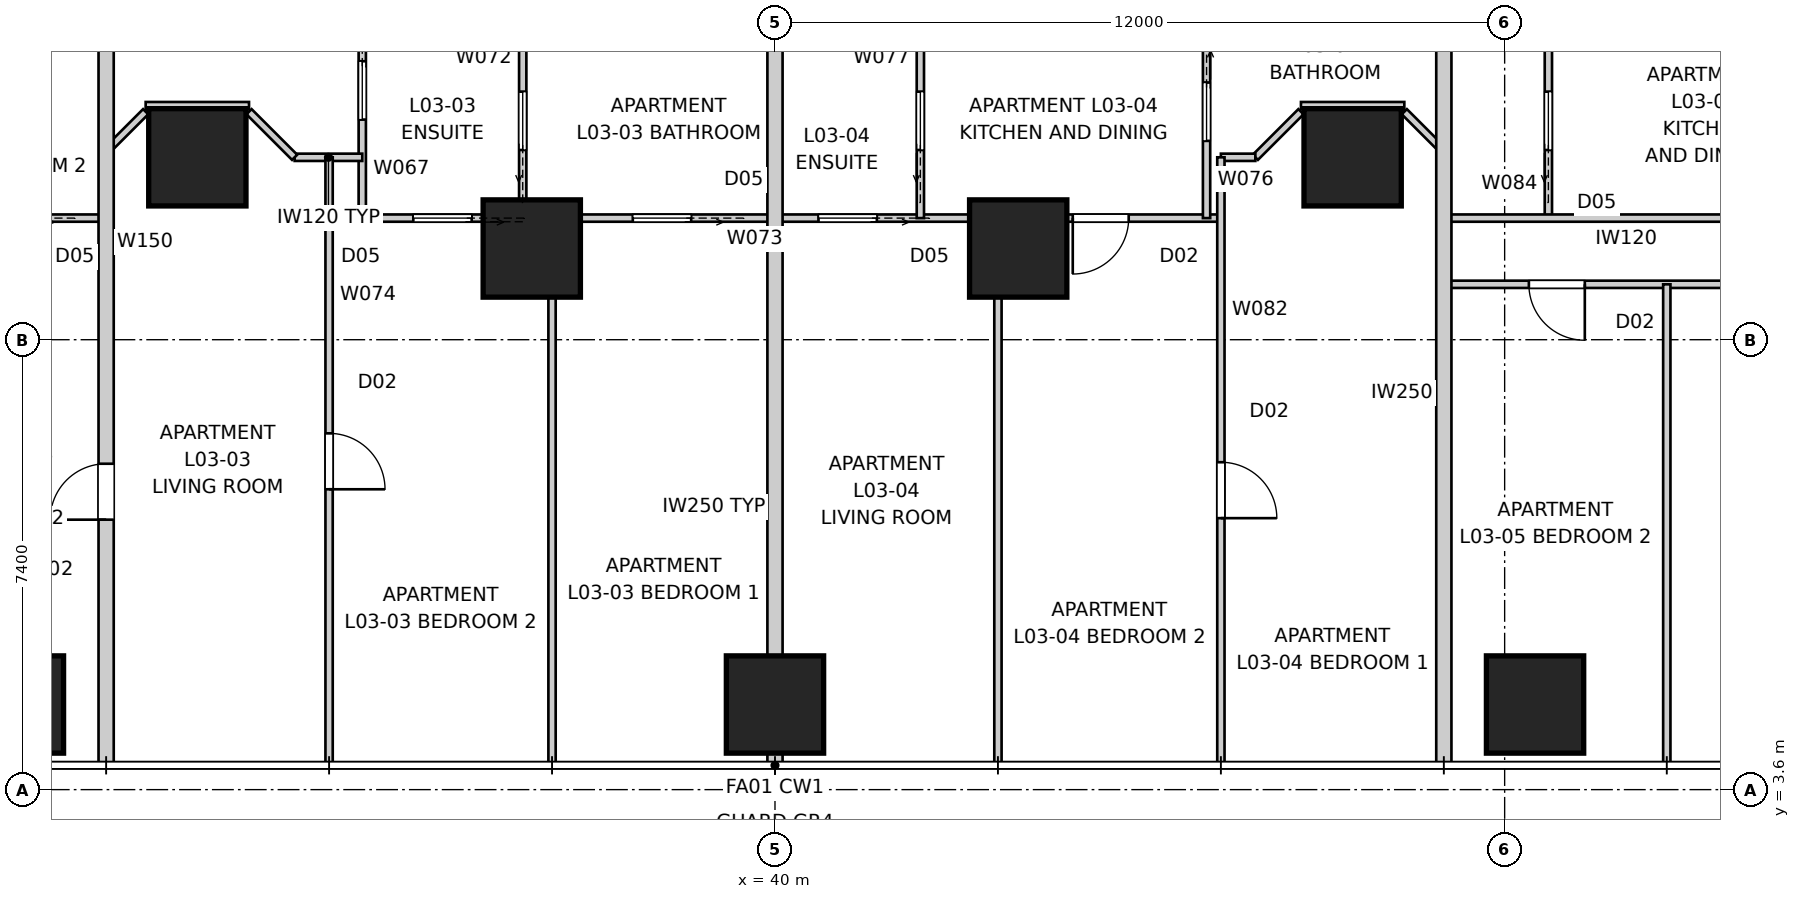
"""IFC4 building model, lengths in metres.
Left out: names, types, materials, properties, quantities, classifications, styles, units other than length and angle.
Written with IfcOpenShell. Run it as: python <this file> out.ifc"""

import sys

from ifc_helpers import new_model, si_unit, direction, frame, frame_2d, origin, origin_2d, place, context, subcontext, project, spatial, rectangle, extrude, element, fill, save


model = new_model("IFC4")
c1 = context("Model", 3, precision=1e-05, world=origin(), true_north=direction((0.0, 1.0)))
c2 = subcontext(c1, "Body", "Model", "MODEL_VIEW")
j1 = project(units=[si_unit("LENGTHUNIT", "METRE"), si_unit("PLANEANGLEUNIT", "RADIAN")], contexts=[c1])
p1 = place(None, origin())
s1 = spatial("IfcSite", under=j1, at=p1, CompositionType="ELEMENT")
p2 = place(p1, origin())
s2 = spatial("IfcBuilding", under=s1, at=p2, CompositionType="ELEMENT")
p3 = place(p2, frame((0.0, 0.0, 15.0)))
s3 = spatial("IfcBuildingStorey", under=s2, at=p3, CompositionType="ELEMENT", Elevation=15.0)
for number, where, z_axis, x_axis in (
    (1, (27.5, 5.0, 0.0), (0.0, 0.0, 1.0), (1.0, 0.0, 0.0)),
    (2, (40.0, 5.0, 0.0), (0.0, 0.0, 1.0), (1.0, 0.0, 0.0)),
    (3, (52.5, 5.0, 0.0), (0.0, 0.0, 1.0), (1.0, 0.0, 0.0)),
    (4, (30.5, 14.0, 0.0), (0.0, 0.0, 1.0), (1.0, 0.0, 0.0)),
    (5, (36.0, 12.5, 0.0), (0.0, 0.0, 1.0), (1.0, 0.0, 0.0)),
    (6, (44.0, 12.5, 0.0), (0.0, 0.0, 1.0), (1.0, 0.0, 0.0)),
    (7, (49.5, 14.0, 0.0), (0.0, 0.0, 1.0), (1.0, 0.0, 0.0)),
):
    element("IfcColumn", number, at=place(p3, frame(where, z_axis=z_axis, x_axis=x_axis)), inside=s3, PredefinedType="COLUMN", context=c2, shape_type="SweptSolid", body=[
        extrude(rectangle(XDim=1.6, YDim=1.6, at=origin_2d()), origin(), (0.0, 0.0, 1.0), 3.4),
    ])
p4 = place(p3, frame((29.0, 4.0, 0.0), z_axis=(0.0, 0.0, 1.0), x_axis=(0.0, 1.0, 0.0)))
e8 = element("IfcWall", 8, at=p4, inside=s3, PredefinedType="PARTITIONING", context=c2, shape_type="SweptSolid", body=[
    extrude(rectangle(XDim=12.24, YDim=0.25, at=frame_2d((6.12, 0.0))), origin(), (0.0, 0.0, 1.0), 3.25),
])
p5 = place(p4, frame((4.04, 0.0, 0.0)))
e9 = element("IfcOpeningElement", 9, at=p5, cuts=e8, PredefinedType="OPENING", context=c2, shape_type="SweptSolid", body=[
    extrude(rectangle(XDim=0.92, YDim=2.34, at=frame_2d((0.46, 1.17))), frame((0.0, 0.135, 0.0), z_axis=(0.0, -1.0, 0.0), x_axis=(1.0, 0.0, 0.0)), (0.0, 0.0, 1.0), 0.27),
])
p6 = place(p3, frame((40.0, 4.0, 0.0), z_axis=(0.0, 0.0, 1.0), x_axis=(0.0, 1.0, 0.0)))
e10 = element("IfcWall", 10, at=p6, inside=s3, PredefinedType="PARTITIONING", context=c2, shape_type="SweptSolid", body=[
    extrude(rectangle(XDim=8.5, YDim=0.25, at=frame_2d((4.25, 0.0))), origin(), (0.0, 0.0, 1.0), 3.25),
])
p7 = place(p3, frame((40.0, 12.5, 0.0), z_axis=(0.0, 0.0, 1.0), x_axis=(0.0, 1.0, 0.0)))
e11 = element("IfcWall", 11, at=p7, inside=s3, PredefinedType="PARTITIONING", context=c2, shape_type="SweptSolid", body=[
    extrude(rectangle(XDim=3.74, YDim=0.25, at=frame_2d((1.87, 0.0))), origin(), (0.0, 0.0, 1.0), 2.796),
])
p8 = place(p3, frame((51.0, 4.0, 0.0), z_axis=(0.0, 0.0, 1.0), x_axis=(0.0, 1.0, 0.0)))
e12 = element("IfcWall", 12, at=p8, inside=s3, PredefinedType="PARTITIONING", context=c2, shape_type="SweptSolid", body=[
    extrude(rectangle(XDim=12.24, YDim=0.25, at=frame_2d((6.12, 0.0))), origin(), (0.0, 0.0, 1.0), 3.25),
])
p9 = place(p3, frame((29.0, 13.0, 0.0), z_axis=(0.0, 0.0, 1.0), x_axis=(-1.0, 0.0, 0.0)))
e13 = element("IfcWall", 13, at=p9, inside=s3, PredefinedType="PARTITIONING", context=c2, shape_type="SweptSolid", body=[
    extrude(rectangle(XDim=6.0, YDim=0.12, at=frame_2d((3.0, 0.0))), origin(), (0.0, 0.0, 1.0), 3.25),
])
p10 = place(p9, frame((1.378, 0.0, 0.0)))
e14 = element("IfcOpeningElement", 14, at=p10, cuts=e13, PredefinedType="OPENING", context=c2, shape_type="SweptSolid", body=[
    extrude(rectangle(XDim=0.96, YDim=2.1, at=frame_2d((0.48, 1.05))), frame((0.0, 0.07, 0.0), z_axis=(0.0, -1.0, 0.0), x_axis=(1.0, 0.0, 0.0)), (0.0, 0.0, 1.0), 0.14),
])
p11 = place(p3, frame((33.212, 16.2, 0.0), z_axis=(0.0, 0.0, 1.0), x_axis=(0.0, -1.0, 0.0)))
e15 = element("IfcWall", 15, at=p11, inside=s3, PredefinedType="PARTITIONING", context=c2, shape_type="SweptSolid", body=[
    extrude(rectangle(XDim=3.2, YDim=0.12, at=frame_2d((1.6, 0.0))), origin(), (0.0, 0.0, 1.0), 3.25),
])
p12 = place(p11, frame((0.62, 0.0, 0.0)))
e16 = element("IfcOpeningElement", 16, at=p12, cuts=e15, PredefinedType="OPENING", context=c2, shape_type="SweptSolid", body=[
    extrude(rectangle(XDim=0.96, YDim=2.1, at=frame_2d((0.48, 1.05))), frame((0.0, 0.07, 0.0), z_axis=(0.0, -1.0, 0.0), x_axis=(1.0, 0.0, 0.0)), (0.0, 0.0, 1.0), 0.14),
])
p13 = place(p3, frame((33.212, 14.0, 0.0), z_axis=(0.0, 0.0, 1.0), x_axis=(-1.0, 0.0, 0.0)))
e17 = element("IfcWall", 17, at=p13, inside=s3, PredefinedType="PARTITIONING", context=c2, shape_type="SweptSolid", body=[
    extrude(rectangle(XDim=1.112, YDim=0.12, at=frame_2d((0.556, 0.0))), origin(), (0.0, 0.0, 1.0), 3.25),
])
p14 = place(p3, frame((32.1, 14.0, 0.0), z_axis=(0.0, 0.0, 1.0), x_axis=(-0.707106781187, 0.707106781187, 0.0)))
e18 = element("IfcWall", 18, at=p14, inside=s3, PredefinedType="PARTITIONING", context=c2, shape_type="SweptSolid", body=[
    extrude(rectangle(XDim=1.061, YDim=0.12, at=frame_2d((0.53, 0.0))), origin(), (0.0, 0.0, 1.0), 3.25),
])
p15 = place(p3, frame((31.35, 14.85, 0.0), z_axis=(0.0, 0.0, 1.0), x_axis=(-1.0, 0.0, 0.0)))
e19 = element("IfcWall", 19, at=p15, inside=s3, PredefinedType="PARTITIONING", context=c2, shape_type="SweptSolid", body=[
    extrude(rectangle(XDim=1.7, YDim=0.12, at=frame_2d((0.85, 0.0))), origin(), (0.0, 0.0, 1.0), 3.25),
])
p16 = place(p3, frame((29.65, 14.75, 0.0), z_axis=(0.0, 0.0, 1.0), x_axis=(-0.707106781187, -0.707106781187, 0.0)))
e20 = element("IfcWall", 20, at=p16, inside=s3, PredefinedType="PARTITIONING", context=c2, shape_type="SweptSolid", body=[
    extrude(rectangle(XDim=0.919, YDim=0.12, at=frame_2d((0.459, 0.0))), origin(), (0.0, 0.0, 1.0), 3.25),
])
p17 = place(p3, frame((35.851, 13.0, 0.0), z_axis=(0.0, 0.0, 1.0), x_axis=(0.0, 1.0, 0.0)))
e21 = element("IfcWall", 21, at=p17, inside=s3, PredefinedType="PARTITIONING", context=c2, shape_type="SweptSolid", body=[
    extrude(rectangle(XDim=3.2, YDim=0.12, at=frame_2d((1.6, 0.0))), origin(), (0.0, 0.0, 1.0), 3.25),
])
p18 = place(p17, frame((1.12, 0.0, 0.0)))
e22 = element("IfcOpeningElement", 22, at=p18, cuts=e21, PredefinedType="OPENING", context=c2, shape_type="SweptSolid", body=[
    extrude(rectangle(XDim=0.96, YDim=2.1, at=frame_2d((0.48, 1.05))), frame((0.0, 0.07, 0.0), z_axis=(0.0, -1.0, 0.0), x_axis=(1.0, 0.0, 0.0)), (0.0, 0.0, 1.0), 0.14),
])
p19 = place(p3, frame((47.333, 13.0, 0.0), z_axis=(0.0, 0.0, 1.0), x_axis=(-1.0, 0.0, 0.0)))
e23 = element("IfcWall", 23, at=p19, inside=s3, PredefinedType="PARTITIONING", context=c2, shape_type="SweptSolid", body=[
    extrude(rectangle(XDim=14.121, YDim=0.12, at=frame_2d((7.061, 0.0))), origin(), (0.0, 0.0, 1.0), 2.549),
])
p20 = place(p19, frame((1.516, 0.0, 0.0)))
e24 = element("IfcOpeningElement", 24, at=p20, cuts=e23, PredefinedType="OPENING", context=c2, shape_type="SweptSolid", body=[
    extrude(rectangle(XDim=0.92, YDim=2.34, at=frame_2d((0.46, 1.17))), frame((0.0, 0.07, 0.0), z_axis=(0.0, -1.0, 0.0), x_axis=(1.0, 0.0, 0.0)), (0.0, 0.0, 1.0), 0.14),
])
p21 = place(p19, frame((5.658, 0.0, 0.0)))
e25 = element("IfcOpeningElement", 25, at=p21, cuts=e23, PredefinedType="OPENING", context=c2, shape_type="SweptSolid", body=[
    extrude(rectangle(XDim=0.96, YDim=2.1, at=frame_2d((0.48, 1.05))), frame((0.0, 0.07, 0.0), z_axis=(0.0, -1.0, 0.0), x_axis=(1.0, 0.0, 0.0)), (0.0, 0.0, 1.0), 0.14),
])
p22 = place(p19, frame((12.322, 0.0, 0.0)))
e26 = element("IfcOpeningElement", 26, at=p22, cuts=e23, PredefinedType="OPENING", context=c2, shape_type="SweptSolid", body=[
    extrude(rectangle(XDim=0.96, YDim=2.1, at=frame_2d((0.48, 1.05))), frame((0.0, 0.07, 0.0), z_axis=(0.0, -1.0, 0.0), x_axis=(1.0, 0.0, 0.0)), (0.0, 0.0, 1.0), 0.14),
])
p23 = place(p19, frame((8.712, 0.0, 0.0)))
e27 = element("IfcOpeningElement", 27, at=p23, cuts=e23, PredefinedType="OPENING", context=c2, shape_type="SweptSolid", body=[
    extrude(rectangle(XDim=0.96, YDim=2.1, at=frame_2d((0.48, 1.05))), frame((0.0, 0.07, 0.0), z_axis=(0.0, -1.0, 0.0), x_axis=(1.0, 0.0, 0.0)), (0.0, 0.0, 1.0), 0.14),
])
p24 = place(p3, frame((32.667, 14.0, 0.0), z_axis=(0.0, 0.0, 1.0), x_axis=(0.0, -1.0, 0.0)))
e28 = element("IfcWall", 28, at=p24, inside=s3, PredefinedType="PARTITIONING", context=c2, shape_type="SweptSolid", body=[
    extrude(rectangle(XDim=9.96, YDim=0.12, at=frame_2d((4.98, 0.0))), origin(), (0.0, 0.0, 1.0), 3.25),
])
p25 = place(p24, frame((4.54, 0.0, 0.0)))
e29 = element("IfcOpeningElement", 29, at=p25, cuts=e28, PredefinedType="OPENING", context=c2, shape_type="SweptSolid", body=[
    extrude(rectangle(XDim=0.92, YDim=2.34, at=frame_2d((0.46, 1.17))), frame((0.0, 0.07, 0.0), z_axis=(0.0, -1.0, 0.0), x_axis=(1.0, 0.0, 0.0)), (0.0, 0.0, 1.0), 0.14),
])
p26 = place(p3, frame((36.333, 4.04, 0.0), z_axis=(0.0, 0.0, 1.0), x_axis=(0.0, 1.0, 0.0)))
e30 = element("IfcWall", 30, at=p26, inside=s3, PredefinedType="PARTITIONING", context=c2, shape_type="SweptSolid", body=[
    extrude(rectangle(XDim=8.96, YDim=0.12, at=frame_2d((4.48, 0.0))), origin(), (0.0, 0.0, 1.0), 3.25),
])
p27 = place(p3, frame((47.098, 16.2, 0.0), z_axis=(0.0, 0.0, 1.0), x_axis=(0.0, -1.0, 0.0)))
e31 = element("IfcWall", 31, at=p27, inside=s3, PredefinedType="PARTITIONING", context=c2, shape_type="SweptSolid", body=[
    extrude(rectangle(XDim=3.2, YDim=0.12, at=frame_2d((1.6, 0.0))), origin(), (0.0, 0.0, 1.0), 3.25),
])
p28 = place(p27, frame((0.97, 0.0, 0.0)))
e32 = element("IfcOpeningElement", 32, at=p28, cuts=e31, PredefinedType="OPENING", context=c2, shape_type="SweptSolid", body=[
    extrude(rectangle(XDim=0.96, YDim=2.1, at=frame_2d((0.48, 1.05))), frame((0.0, 0.07, 0.0), z_axis=(0.0, -1.0, 0.0), x_axis=(1.0, 0.0, 0.0)), (0.0, 0.0, 1.0), 0.14),
])
p29 = place(p3, frame((42.391, 13.0, 0.0), z_axis=(0.0, 0.0, 1.0), x_axis=(0.0, 1.0, 0.0)))
e33 = element("IfcWall", 33, at=p29, inside=s3, PredefinedType="PARTITIONING", context=c2, shape_type="SweptSolid", body=[
    extrude(rectangle(XDim=3.2, YDim=0.12, at=frame_2d((1.6, 0.0))), origin(), (0.0, 0.0, 1.0), 3.25),
])
p30 = place(p29, frame((1.12, 0.0, 0.0)))
e34 = element("IfcOpeningElement", 34, at=p30, cuts=e33, PredefinedType="OPENING", context=c2, shape_type="SweptSolid", body=[
    extrude(rectangle(XDim=0.96, YDim=2.1, at=frame_2d((0.48, 1.05))), frame((0.0, 0.07, 0.0), z_axis=(0.0, -1.0, 0.0), x_axis=(1.0, 0.0, 0.0)), (0.0, 0.0, 1.0), 0.14),
])
p31 = place(p3, frame((51.0, 14.1, 0.0), z_axis=(0.0, 0.0, 1.0), x_axis=(-0.707106781187, 0.707106781187, 0.0)))
e35 = element("IfcWall", 35, at=p31, inside=s3, PredefinedType="PARTITIONING", context=c2, shape_type="SweptSolid", body=[
    extrude(rectangle(XDim=0.919, YDim=0.12, at=frame_2d((0.459, 0.0))), origin(), (0.0, 0.0, 1.0), 3.25),
])
p32 = place(p3, frame((50.35, 14.85, 0.0), z_axis=(0.0, 0.0, 1.0), x_axis=(-1.0, 0.0, 0.0)))
e36 = element("IfcWall", 36, at=p32, inside=s3, PredefinedType="PARTITIONING", context=c2, shape_type="SweptSolid", body=[
    extrude(rectangle(XDim=1.7, YDim=0.12, at=frame_2d((0.85, 0.0))), origin(), (0.0, 0.0, 1.0), 3.25),
])
p33 = place(p3, frame((48.65, 14.75, 0.0), z_axis=(0.0, 0.0, 1.0), x_axis=(-0.707106781187, -0.707106781187, 0.0)))
e37 = element("IfcWall", 37, at=p33, inside=s3, PredefinedType="PARTITIONING", context=c2, shape_type="SweptSolid", body=[
    extrude(rectangle(XDim=1.061, YDim=0.12, at=frame_2d((0.53, 0.0))), origin(), (0.0, 0.0, 1.0), 3.25),
])
p34 = place(p3, frame((47.9, 14.0, 0.0), z_axis=(0.0, 0.0, 1.0), x_axis=(-1.0, 0.0, 0.0)))
e38 = element("IfcWall", 38, at=p34, inside=s3, PredefinedType="PARTITIONING", context=c2, shape_type="SweptSolid", body=[
    extrude(rectangle(XDim=0.567, YDim=0.12, at=frame_2d((0.283, 0.0))), origin(), (0.0, 0.0, 1.0), 3.25),
])
p35 = place(p3, frame((47.333, 14.0, 0.0), z_axis=(0.0, 0.0, 1.0), x_axis=(0.0, -1.0, 0.0)))
e39 = element("IfcWall", 39, at=p35, inside=s3, PredefinedType="PARTITIONING", context=c2, shape_type="SweptSolid", body=[
    extrude(rectangle(XDim=9.96, YDim=0.12, at=frame_2d((4.98, 0.0))), origin(), (0.0, 0.0, 1.0), 3.25),
])
p36 = place(p35, frame((5.015, 0.0, 0.0)))
e40 = element("IfcOpeningElement", 40, at=p36, cuts=e39, PredefinedType="OPENING", context=c2, shape_type="SweptSolid", body=[
    extrude(rectangle(XDim=0.92, YDim=2.34, at=frame_2d((0.46, 1.17))), frame((0.0, 0.07, 0.0), z_axis=(0.0, -1.0, 0.0), x_axis=(1.0, 0.0, 0.0)), (0.0, 0.0, 1.0), 0.14),
])
p37 = place(p3, frame((43.667, 13.0, 0.0), z_axis=(0.0, 0.0, 1.0), x_axis=(0.0, -1.0, 0.0)))
e41 = element("IfcWall", 41, at=p37, inside=s3, PredefinedType="PARTITIONING", context=c2, shape_type="SweptSolid", body=[
    extrude(rectangle(XDim=8.96, YDim=0.12, at=frame_2d((4.48, 0.0))), origin(), (0.0, 0.0, 1.0), 3.25),
])
p38 = place(p3, frame((52.719, 13.0, 0.0), z_axis=(0.0, 0.0, 1.0), x_axis=(0.0, 1.0, 0.0)))
e42 = element("IfcWall", 42, at=p38, inside=s3, PredefinedType="PARTITIONING", context=c2, shape_type="SweptSolid", body=[
    extrude(rectangle(XDim=3.2, YDim=0.12, at=frame_2d((1.6, 0.0))), origin(), (0.0, 0.0, 1.0), 3.25),
])
p39 = place(p38, frame((1.12, 0.0, 0.0)))
e43 = element("IfcOpeningElement", 43, at=p39, cuts=e42, PredefinedType="OPENING", context=c2, shape_type="SweptSolid", body=[
    extrude(rectangle(XDim=0.96, YDim=2.1, at=frame_2d((0.48, 1.05))), frame((0.0, 0.07, 0.0), z_axis=(0.0, -1.0, 0.0), x_axis=(1.0, 0.0, 0.0)), (0.0, 0.0, 1.0), 0.14),
])
p40 = place(p3, frame((57.0, 13.0, 0.0), z_axis=(0.0, 0.0, 1.0), x_axis=(-1.0, 0.0, 0.0)))
e44 = element("IfcWall", 44, at=p40, inside=s3, PredefinedType="PARTITIONING", context=c2, shape_type="SweptSolid", body=[
    extrude(rectangle(XDim=6.0, YDim=0.12, at=frame_2d((3.0, 0.0))), origin(), (0.0, 0.0, 1.0), 3.25),
])
p41 = place(p3, frame((65.96, 11.911, 0.0), z_axis=(0.0, 0.0, 1.0), x_axis=(-1.0, 0.0, 0.0)))
e45 = element("IfcWall", 45, at=p41, inside=s3, PredefinedType="PARTITIONING", context=c2, shape_type="SweptSolid", body=[
    extrude(rectangle(XDim=14.96, YDim=0.12, at=frame_2d((7.48, 0.0))), origin(), (0.0, 0.0, 1.0), 3.25),
])
p42 = place(p41, frame((7.742, 0.0, 0.0)))
e46 = element("IfcOpeningElement", 46, at=p42, cuts=e45, PredefinedType="OPENING", context=c2, shape_type="SweptSolid", body=[
    extrude(rectangle(XDim=0.92, YDim=2.34, at=frame_2d((0.46, 1.17))), frame((0.0, 0.07, 0.0), z_axis=(0.0, -1.0, 0.0), x_axis=(1.0, 0.0, 0.0)), (0.0, 0.0, 1.0), 0.14),
])
p43 = place(p41, frame((12.642, 0.0, 0.0)))
e47 = element("IfcOpeningElement", 47, at=p43, cuts=e45, PredefinedType="OPENING", context=c2, shape_type="SweptSolid", body=[
    extrude(rectangle(XDim=0.92, YDim=2.34, at=frame_2d((0.46, 1.17))), frame((0.0, 0.07, 0.0), z_axis=(0.0, -1.0, 0.0), x_axis=(1.0, 0.0, 0.0)), (0.0, 0.0, 1.0), 0.14),
])
p44 = place(p3, frame((54.667, 4.04, 0.0), z_axis=(0.0, 0.0, 1.0), x_axis=(0.0, 1.0, 0.0)))
e48 = element("IfcWall", 48, at=p44, inside=s3, PredefinedType="PARTITIONING", context=c2, shape_type="SweptSolid", body=[
    extrude(rectangle(XDim=7.871, YDim=0.12, at=frame_2d((3.936, 0.0))), origin(), (0.0, 0.0, 1.0), 2.637),
])
p45 = place(p20, origin())
e49 = element("IfcDoor", 49, at=p45, inside=s3, OperationType="SINGLE_SWING_RIGHT", PredefinedType="DOOR", context=c2, shape_type="SweptSolid", body=[
    extrude(rectangle(XDim=0.92, YDim=2.34, at=frame_2d((0.46, 1.17))), frame((0.0, 0.025, 0.0), z_axis=(0.0, -1.0, 0.0), x_axis=(1.0, 0.0, 0.0)), (0.0, 0.0, 1.0), 0.05),
])
fill(e24, e49)
p46 = place(p28, origin())
e50 = element("IfcDoor", 50, at=p46, inside=s3, OperationType="SLIDING_TO_LEFT", PredefinedType="DOOR", context=c2, shape_type="SweptSolid", body=[
    extrude(rectangle(XDim=0.96, YDim=2.1, at=frame_2d((0.48, 1.05))), frame((0.0, 0.025, 0.0), z_axis=(0.0, -1.0, 0.0), x_axis=(1.0, 0.0, 0.0)), (0.0, 0.0, 1.0), 0.05),
])
fill(e32, e50)
p47 = place(p30, origin())
e51 = element("IfcDoor", 51, at=p47, inside=s3, OperationType="SLIDING_TO_LEFT", PredefinedType="DOOR", context=c2, shape_type="SweptSolid", body=[
    extrude(rectangle(XDim=0.96, YDim=2.1, at=frame_2d((0.48, 1.05))), frame((0.0, 0.025, 0.0), z_axis=(0.0, -1.0, 0.0), x_axis=(1.0, 0.0, 0.0)), (0.0, 0.0, 1.0), 0.05),
])
fill(e34, e51)
p48 = place(p12, origin())
e52 = element("IfcDoor", 52, at=p48, inside=s3, OperationType="SLIDING_TO_LEFT", PredefinedType="DOOR", context=c2, shape_type="SweptSolid", body=[
    extrude(rectangle(XDim=0.96, YDim=2.1, at=frame_2d((0.48, 1.05))), frame((0.0, 0.025, 0.0), z_axis=(0.0, -1.0, 0.0), x_axis=(1.0, 0.0, 0.0)), (0.0, 0.0, 1.0), 0.05),
])
fill(e16, e52)
p49 = place(p39, origin())
e53 = element("IfcDoor", 53, at=p49, inside=s3, OperationType="SLIDING_TO_LEFT", PredefinedType="DOOR", context=c2, shape_type="SweptSolid", body=[
    extrude(rectangle(XDim=0.96, YDim=2.1, at=frame_2d((0.48, 1.05))), frame((0.0, 0.025, 0.0), z_axis=(0.0, -1.0, 0.0), x_axis=(1.0, 0.0, 0.0)), (0.0, 0.0, 1.0), 0.05),
])
fill(e43, e53)
p50 = place(p21, origin())
e54 = element("IfcDoor", 54, at=p50, inside=s3, OperationType="SLIDING_TO_LEFT", PredefinedType="DOOR", context=c2, shape_type="SweptSolid", body=[
    extrude(rectangle(XDim=0.96, YDim=2.1, at=frame_2d((0.48, 1.05))), frame((0.0, 0.025, 0.0), z_axis=(0.0, -1.0, 0.0), x_axis=(1.0, 0.0, 0.0)), (0.0, 0.0, 1.0), 0.05),
])
fill(e25, e54)
p51 = place(p18, origin())
e55 = element("IfcDoor", 55, at=p51, inside=s3, OperationType="SLIDING_TO_LEFT", PredefinedType="DOOR", context=c2, shape_type="SweptSolid", body=[
    extrude(rectangle(XDim=0.96, YDim=2.1, at=frame_2d((0.48, 1.05))), frame((0.0, 0.025, 0.0), z_axis=(0.0, -1.0, 0.0), x_axis=(1.0, 0.0, 0.0)), (0.0, 0.0, 1.0), 0.05),
])
fill(e22, e55)
p52 = place(p22, origin())
e56 = element("IfcDoor", 56, at=p52, inside=s3, OperationType="SLIDING_TO_LEFT", PredefinedType="DOOR", context=c2, shape_type="SweptSolid", body=[
    extrude(rectangle(XDim=0.96, YDim=2.1, at=frame_2d((0.48, 1.05))), frame((0.0, 0.025, 0.0), z_axis=(0.0, -1.0, 0.0), x_axis=(1.0, 0.0, 0.0)), (0.0, 0.0, 1.0), 0.05),
])
fill(e26, e56)
p53 = place(p43, origin())
e57 = element("IfcDoor", 57, at=p53, inside=s3, OperationType="SINGLE_SWING_LEFT", PredefinedType="DOOR", context=c2, shape_type="SweptSolid", body=[
    extrude(rectangle(XDim=0.92, YDim=2.34, at=frame_2d((0.46, 1.17))), frame((0.0, 0.025, 0.0), z_axis=(0.0, -1.0, 0.0), x_axis=(1.0, 0.0, 0.0)), (0.0, 0.0, 1.0), 0.05),
])
fill(e47, e57)
p54 = place(p23, origin())
e58 = element("IfcDoor", 58, at=p54, inside=s3, OperationType="SLIDING_TO_LEFT", PredefinedType="DOOR", context=c2, shape_type="SweptSolid", body=[
    extrude(rectangle(XDim=0.96, YDim=2.1, at=frame_2d((0.48, 1.05))), frame((0.0, 0.025, 0.0), z_axis=(0.0, -1.0, 0.0), x_axis=(1.0, 0.0, 0.0)), (0.0, 0.0, 1.0), 0.05),
])
fill(e27, e58)
p55 = place(p36, origin())
e59 = element("IfcDoor", 59, at=p55, inside=s3, OperationType="SINGLE_SWING_RIGHT", PredefinedType="DOOR", context=c2, shape_type="SweptSolid", body=[
    extrude(rectangle(XDim=0.92, YDim=2.34, at=frame_2d((0.46, 1.17))), frame((0.0, 0.025, 0.0), z_axis=(0.0, -1.0, 0.0), x_axis=(1.0, 0.0, 0.0)), (0.0, 0.0, 1.0), 0.05),
])
fill(e40, e59)
p56 = place(p25, origin())
e60 = element("IfcDoor", 60, at=p56, inside=s3, OperationType="SINGLE_SWING_RIGHT", PredefinedType="DOOR", context=c2, shape_type="SweptSolid", body=[
    extrude(rectangle(XDim=0.92, YDim=2.34, at=frame_2d((0.46, 1.17))), frame((0.0, 0.025, 0.0), z_axis=(0.0, -1.0, 0.0), x_axis=(1.0, 0.0, 0.0)), (0.0, 0.0, 1.0), 0.05),
])
fill(e29, e60)
p57 = place(p5, origin())
e61 = element("IfcDoor", 61, at=p57, inside=s3, OperationType="SINGLE_SWING_LEFT", PredefinedType="DOOR", context=c2, shape_type="SweptSolid", body=[
    extrude(rectangle(XDim=0.92, YDim=2.34, at=frame_2d((0.46, 1.17))), frame((0.0, 0.025, 0.0), z_axis=(0.0, -1.0, 0.0), x_axis=(1.0, 0.0, 0.0)), (0.0, 0.0, 1.0), 0.05),
])
fill(e9, e61)
save(model, sys.argv[1])
